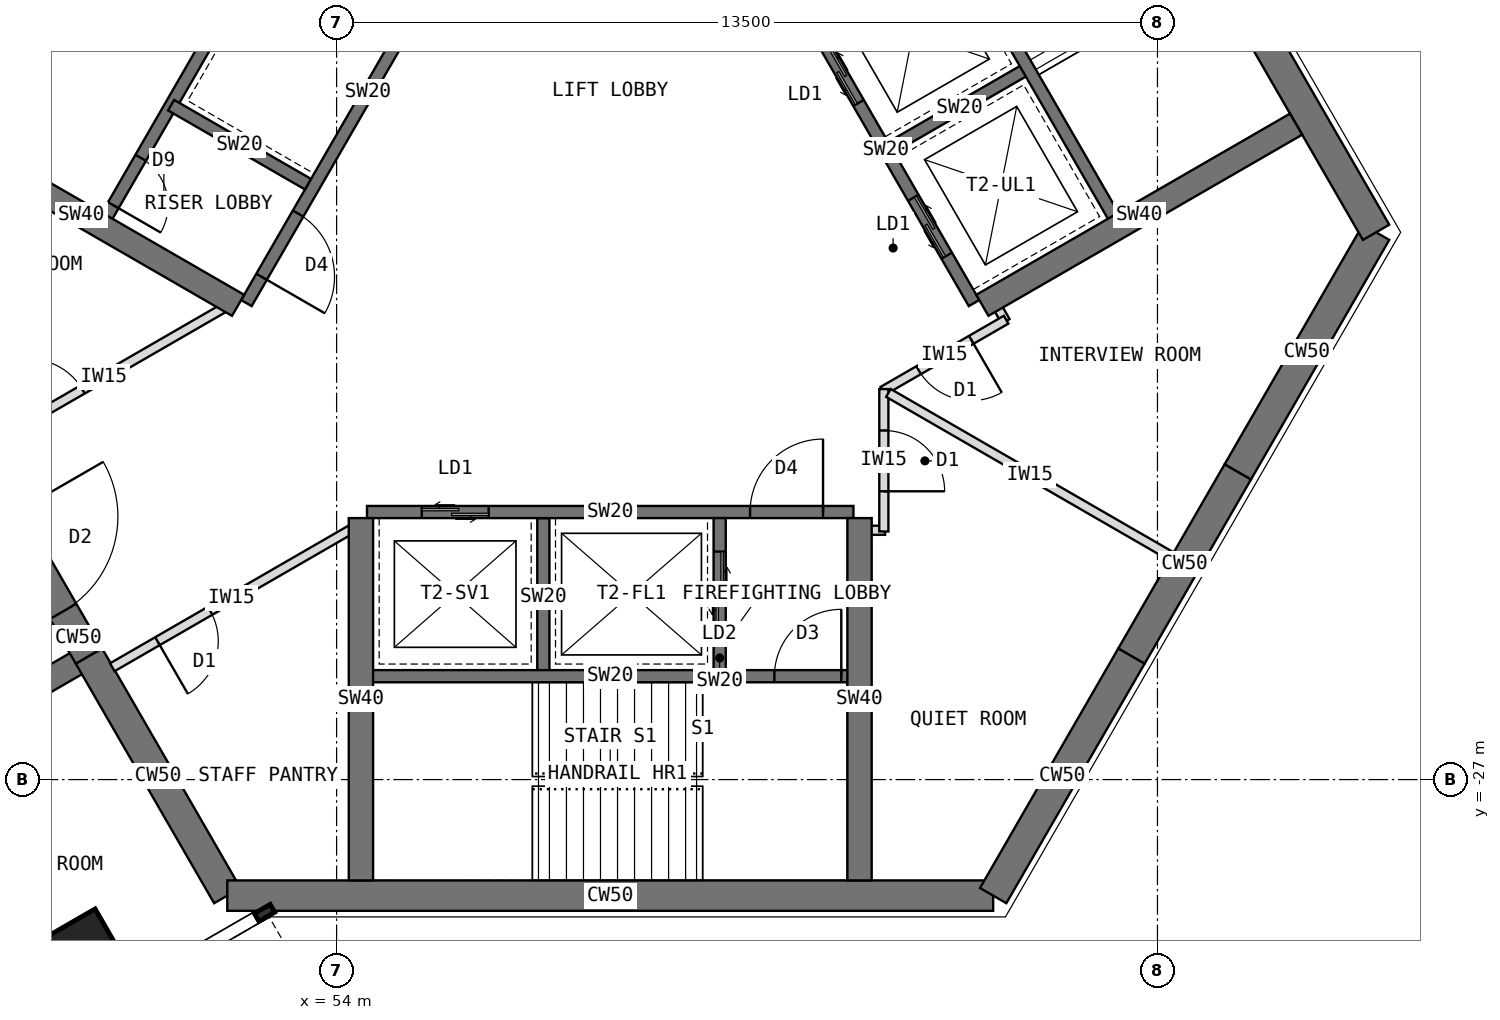
"""IFC4 building model, lengths in metres.
Left out: names, types, materials, properties, quantities, classifications, styles, units other than length and angle.
Written with IfcOpenShell. Run it as: python <this file> out.ifc"""

import sys

from ifc_helpers import new_model, si_unit, direction, frame, frame_2d, origin, origin_2d, place, context, subcontext, project, spatial, rectangle, extrude, element, fill, save


model = new_model("IFC4")
c1 = context("Model", 3, precision=1e-05, world=origin(), true_north=direction((0.0, 1.0)))
c2 = subcontext(c1, "Body", "Model", "MODEL_VIEW")
j1 = project(units=[si_unit("LENGTHUNIT", "METRE"), si_unit("PLANEANGLEUNIT", "RADIAN")], contexts=[c1])
p1 = place(None, origin())
s1 = spatial("IfcSite", under=j1, at=p1, CompositionType="ELEMENT")
p2 = place(p1, origin())
s2 = spatial("IfcBuilding", under=s1, at=p2, CompositionType="ELEMENT")
p3 = place(p2, frame((0.0, 0.0, 186.5)))
s3 = spatial("IfcBuildingStorey", under=s2, at=p3, CompositionType="ELEMENT", Elevation=186.5)
p4 = place(p3, frame((52.202, -7.092, 0.0), z_axis=(0.0, 0.0, 1.0), x_axis=(-0.500005998175, -0.866021940709, 0.0)))
e1 = element("IfcWall", 1, at=p4, inside=s3, PredefinedType="SHEAR", context=c2, shape_type="SweptSolid", body=[
    extrude(rectangle(XDim=12.596, YDim=0.5, at=frame_2d((6.298, 0.0))), origin(), (0.0, 0.0, 1.0), 4.0),
])
p5 = place(p3, frame((48.178, -21.939, 0.0), z_axis=(0.0, 0.0, 1.0), x_axis=(0.500010275428, -0.866019471182, 0.0)))
e2 = element("IfcWall", 2, at=p5, inside=s3, PredefinedType="SHEAR", context=c2, shape_type="SweptSolid", body=[
    extrude(rectangle(XDim=3.5, YDim=0.5, at=frame_2d((1.75, 0.0))), origin(), (0.0, 0.0, 1.0), 4.0),
])
p6 = place(p5, frame((0.85, 0.0, 0.0)))
e3 = element("IfcOpeningElement", 3, at=p6, cuts=e2, PredefinedType="OPENING", context=c2, shape_type="SweptSolid", body=[
    extrude(rectangle(XDim=1.8, YDim=2.1, at=frame_2d((0.9, 1.05))), frame((0.0, 0.26, 0.0), z_axis=(0.0, -1.0, 0.0), x_axis=(1.0, 0.0, 0.0)), (0.0, 0.0, 1.0), 0.52),
])
p7 = place(p3, frame((49.928, -24.97, 0.0), z_axis=(0.0, 0.0, 1.0), x_axis=(0.499984222037, -0.866034513004, 0.0)))
e4 = element("IfcWall", 4, at=p7, inside=s3, PredefinedType="SHEAR", context=c2, shape_type="SweptSolid", body=[
    extrude(rectangle(XDim=4.548, YDim=0.5, at=frame_2d((2.274, 0.0))), origin(), (0.0, 0.0, 1.0), 4.0),
])
p8 = place(p3, frame((52.202, -28.908, 0.0), z_axis=(0.0, 0.0, 1.0), x_axis=(1.0, 0.0, 0.0)))
e5 = element("IfcWall", 5, at=p8, inside=s3, PredefinedType="SHEAR", context=c2, shape_type="SweptSolid", body=[
    extrude(rectangle(XDim=12.596, YDim=0.5, at=frame_2d((6.298, 0.0))), origin(), (0.0, 0.0, 1.0), 4.0),
])
p9 = place(p3, frame((64.798, -28.908, 0.0), z_axis=(0.0, 0.0, 1.0), x_axis=(0.499984222037, 0.866034513004, 0.0)))
e6 = element("IfcWall", 6, at=p9, inside=s3, PredefinedType="SHEAR", context=c2, shape_type="SweptSolid", body=[
    extrude(rectangle(XDim=4.548, YDim=0.5, at=frame_2d((2.274, 0.0))), origin(), (0.0, 0.0, 1.0), 4.0),
])
p10 = place(p3, frame((67.072, -24.97, 0.0), z_axis=(0.0, 0.0, 1.0), x_axis=(0.500010275428, 0.866019471182, 0.0)))
e7 = element("IfcWall", 7, at=p10, inside=s3, PredefinedType="SHEAR", context=c2, shape_type="SweptSolid", body=[
    extrude(rectangle(XDim=3.5, YDim=0.5, at=frame_2d((1.75, 0.0))), origin(), (0.0, 0.0, 1.0), 4.0),
])
p11 = place(p3, frame((68.822, -21.939, 0.0), z_axis=(0.0, 0.0, 1.0), x_axis=(0.500024481964, 0.866011268655, 0.0)))
e8 = element("IfcWall", 8, at=p11, inside=s3, PredefinedType="SHEAR", context=c2, shape_type="SweptSolid", body=[
    extrude(rectangle(XDim=4.548, YDim=0.5, at=frame_2d((2.274, 0.0))), origin(), (0.0, 0.0, 1.0), 4.0),
])
p12 = place(p3, frame((71.096, -18.0, 0.0), z_axis=(0.0, 0.0, 1.0), x_axis=(-0.500005998175, 0.866021940709, 0.0)))
e9 = element("IfcWall", 9, at=p12, inside=s3, PredefinedType="SHEAR", context=c2, shape_type="SweptSolid", body=[
    extrude(rectangle(XDim=12.596, YDim=0.5, at=frame_2d((6.298, 0.0))), origin(), (0.0, 0.0, 1.0), 4.0),
])
p13 = place(p3, frame((49.928, -24.97, 0.0), z_axis=(0.0, 0.0, 1.0), x_axis=(-0.866031863473, -0.499988811324, 0.0)))
e10 = element("IfcWall", 10, at=p13, inside=s3, PredefinedType="SHEAR", context=c2, shape_type="SweptSolid", body=[
    extrude(rectangle(XDim=2.592, YDim=0.4, at=frame_2d((1.296, 0.0))), origin(), (0.0, 0.0, 1.0), 4.0),
])
p14 = place(p3, frame((49.809, -29.946, 0.0), z_axis=(0.0, 0.0, 1.0), x_axis=(0.866025403784, 0.5, 0.0)))
e11 = element("IfcColumn", 11, at=p14, inside=s3, PredefinedType="COLUMN", context=c2, shape_type="SweptSolid", body=[
    extrude(rectangle(XDim=1.2, YDim=1.2, at=origin_2d()), origin(), (0.0, 0.0, 1.0), 4.0),
])
p15 = place(p3, frame((56.516, -12.236, 0.0), z_axis=(0.0, 0.0, 1.0), x_axis=(-0.49999894854, -0.866026010844, 0.0)))
e12 = element("IfcWall", 12, at=p15, inside=s3, PredefinedType="SHEAR", context=c2, shape_type="SweptSolid", body=[
    extrude(rectangle(XDim=8.0, YDim=0.2, at=frame_2d((4.0, 0.0))), origin(), (0.0, 0.0, 1.0), 4.0),
])
p16 = place(p15, frame((6.3, 0.0, 0.0)))
e13 = element("IfcOpeningElement", 13, at=p16, cuts=e12, PredefinedType="OPENING", context=c2, shape_type="SweptSolid", body=[
    extrude(rectangle(XDim=1.2, YDim=2.1, at=frame_2d((0.6, 1.05))), frame((0.0, 0.11, 0.0), z_axis=(0.0, -1.0, 0.0), x_axis=(1.0, 0.0, 0.0)), (0.0, 0.0, 1.0), 0.22),
])
p17 = place(p3, frame((53.53, -17.209, 0.0), z_axis=(0.0, 0.0, 1.0), x_axis=(-0.866062058628, 0.499936506574, 0.0)))
e14 = element("IfcWall", 14, at=p17, inside=s3, PredefinedType="SHEAR", context=c2, shape_type="SweptSolid", body=[
    extrude(rectangle(XDim=2.6, YDim=0.2, at=frame_2d((1.3, 0.0))), origin(), (0.0, 0.0, 1.0), 4.0),
])
p18 = place(p3, frame((54.178, -10.886, 0.0), z_axis=(0.0, 0.0, 1.0), x_axis=(-0.49999894854, -0.866026010844, 0.0)))
e15 = element("IfcWall", 15, at=p18, inside=s3, PredefinedType="SHEAR", context=c2, shape_type="SweptSolid", body=[
    extrude(rectangle(XDim=8.0, YDim=0.2, at=frame_2d((4.0, 0.0))), origin(), (0.0, 0.0, 1.0), 4.0),
])
p19 = place(p18, frame((6.8, 0.0, 0.0)))
e16 = element("IfcOpeningElement", 16, at=p19, cuts=e15, PredefinedType="OPENING", context=c2, shape_type="SweptSolid", body=[
    extrude(rectangle(XDim=0.9, YDim=2.1, at=frame_2d((0.45, 1.05))), frame((0.0, 0.11, 0.0), z_axis=(0.0, -1.0, 0.0), x_axis=(1.0, 0.0, 0.0)), (0.0, 0.0, 1.0), 0.22),
])
p20 = place(p3, frame((52.38, -19.201, 0.0), z_axis=(0.0, 0.0, 1.0), x_axis=(-0.866012946976, 0.500021575205, 0.0)))
e17 = element("IfcWall", 17, at=p20, inside=s3, PredefinedType="SHEAR", context=c2, shape_type="SweptSolid", body=[
    extrude(rectangle(XDim=5.958, YDim=0.4, at=frame_2d((2.979, 0.0))), origin(), (0.0, 0.0, 1.0), 4.0),
])
p21 = place(p3, frame((54.5, -22.6, 0.0), z_axis=(0.0, 0.0, 1.0), x_axis=(1.0, 0.0, 0.0)))
e18 = element("IfcWall", 18, at=p21, inside=s3, PredefinedType="SHEAR", context=c2, shape_type="SweptSolid", body=[
    extrude(rectangle(XDim=8.0, YDim=0.2, at=frame_2d((4.0, 0.0))), origin(), (0.0, 0.0, 1.0), 4.0),
])
p22 = place(p21, frame((6.3, 0.0, 0.0)))
e19 = element("IfcOpeningElement", 19, at=p22, cuts=e18, PredefinedType="OPENING", context=c2, shape_type="SweptSolid", body=[
    extrude(rectangle(XDim=1.2, YDim=2.1, at=frame_2d((0.6, 1.05))), frame((0.0, 0.11, 0.0), z_axis=(0.0, -1.0, 0.0), x_axis=(1.0, 0.0, 0.0)), (0.0, 0.0, 1.0), 0.22),
])
p23 = place(p21, frame((0.9, 0.0, 0.0)))
e20 = element("IfcOpeningElement", 20, at=p23, cuts=e18, PredefinedType="OPENING", context=c2, shape_type="SweptSolid", body=[
    extrude(rectangle(XDim=1.1, YDim=2.2, at=frame_2d((0.55, 1.1))), frame((0.0, 0.11, 0.0), z_axis=(0.0, -1.0, 0.0), x_axis=(1.0, 0.0, 0.0)), (0.0, 0.0, 1.0), 0.22),
])
p24 = place(p3, frame((57.4, -22.7, 0.0), z_axis=(0.0, 0.0, 1.0), x_axis=(0.0, -1.0, 0.0)))
e21 = element("IfcWall", 21, at=p24, inside=s3, PredefinedType="SHEAR", context=c2, shape_type="SweptSolid", body=[
    extrude(rectangle(XDim=2.6, YDim=0.2, at=frame_2d((1.3, 0.0))), origin(), (0.0, 0.0, 1.0), 4.0),
])
p25 = place(p3, frame((60.3, -22.7, 0.0), z_axis=(0.0, 0.0, 1.0), x_axis=(0.0, -1.0, 0.0)))
e22 = element("IfcWall", 22, at=p25, inside=s3, PredefinedType="SHEAR", context=c2, shape_type="SweptSolid", body=[
    extrude(rectangle(XDim=2.6, YDim=0.2, at=frame_2d((1.3, 0.0))), origin(), (0.0, 0.0, 1.0), 4.0),
])
p26 = place(p25, frame((0.55, 0.0, 0.0)))
e23 = element("IfcOpeningElement", 23, at=p26, cuts=e22, PredefinedType="OPENING", context=c2, shape_type="SweptSolid", body=[
    extrude(rectangle(XDim=1.3, YDim=2.2, at=frame_2d((0.65, 1.1))), frame((0.0, 0.11, 0.0), z_axis=(0.0, -1.0, 0.0), x_axis=(1.0, 0.0, 0.0)), (0.0, 0.0, 1.0), 0.22),
])
p27 = place(p3, frame((54.5, -25.3, 0.0), z_axis=(0.0, 0.0, 1.0), x_axis=(1.0, 0.0, 0.0)))
e24 = element("IfcWall", 24, at=p27, inside=s3, PredefinedType="SHEAR", context=c2, shape_type="SweptSolid", body=[
    extrude(rectangle(XDim=8.0, YDim=0.2, at=frame_2d((4.0, 0.0))), origin(), (0.0, 0.0, 1.0), 4.0),
])
p28 = place(p27, frame((6.7, 0.0, 0.0)))
e25 = element("IfcOpeningElement", 25, at=p28, cuts=e24, PredefinedType="OPENING", context=c2, shape_type="SweptSolid", body=[
    extrude(rectangle(XDim=1.1, YDim=2.1, at=frame_2d((0.55, 1.05))), frame((0.0, 0.11, 0.0), z_axis=(0.0, -1.0, 0.0), x_axis=(1.0, 0.0, 0.0)), (0.0, 0.0, 1.0), 0.22),
])
for number, where, z_axis, x_axis in (
    (26, (62.6, -22.7, 0.0), (0.0, 0.0, 1.0), (0.0, -1.0, 0.0)),
    (27, (54.4, -22.7, 0.0), (0.0, 0.0, 1.0), (0.0, -1.0, 0.0)),
):
    element("IfcWall", number, at=place(p3, frame(where, z_axis=z_axis, x_axis=x_axis)), inside=s3, PredefinedType="SHEAR", context=c2, shape_type="SweptSolid", body=[
        extrude(rectangle(XDim=5.958, YDim=0.4, at=frame_2d((2.979, 0.0))), origin(), (0.0, 0.0, 1.0), 4.0),
    ])
p29 = place(p3, frame((64.484, -19.164, 0.0), z_axis=(0.0, 0.0, 1.0), x_axis=(-0.49999894854, 0.866026010844, 0.0)))
e28 = element("IfcWall", 28, at=p29, inside=s3, PredefinedType="SHEAR", context=c2, shape_type="SweptSolid", body=[
    extrude(rectangle(XDim=8.0, YDim=0.2, at=frame_2d((4.0, 0.0))), origin(), (0.0, 0.0, 1.0), 4.0),
])
p30 = place(p29, frame((6.3, 0.0, 0.0)))
e29 = element("IfcOpeningElement", 29, at=p30, cuts=e28, PredefinedType="OPENING", context=c2, shape_type="SweptSolid", body=[
    extrude(rectangle(XDim=1.2, YDim=2.1, at=frame_2d((0.6, 1.05))), frame((0.0, 0.11, 0.0), z_axis=(0.0, -1.0, 0.0), x_axis=(1.0, 0.0, 0.0)), (0.0, 0.0, 1.0), 0.22),
])
p31 = place(p29, frame((0.9, 0.0, 0.0)))
e30 = element("IfcOpeningElement", 30, at=p31, cuts=e28, PredefinedType="OPENING", context=c2, shape_type="SweptSolid", body=[
    extrude(rectangle(XDim=1.1, YDim=2.2, at=frame_2d((0.55, 1.1))), frame((0.0, 0.11, 0.0), z_axis=(0.0, -1.0, 0.0), x_axis=(1.0, 0.0, 0.0)), (0.0, 0.0, 1.0), 0.22),
])
p32 = place(p29, frame((3.8, 0.0, 0.0)))
e31 = element("IfcOpeningElement", 31, at=p32, cuts=e28, PredefinedType="OPENING", context=c2, shape_type="SweptSolid", body=[
    extrude(rectangle(XDim=1.1, YDim=2.2, at=frame_2d((0.55, 1.1))), frame((0.0, 0.11, 0.0), z_axis=(0.0, -1.0, 0.0), x_axis=(1.0, 0.0, 0.0)), (0.0, 0.0, 1.0), 0.22),
])
p33 = place(p3, frame((63.12, -16.603, 0.0), z_axis=(0.0, 0.0, 1.0), x_axis=(0.866062058628, 0.499936506574, 0.0)))
e32 = element("IfcWall", 32, at=p33, inside=s3, PredefinedType="SHEAR", context=c2, shape_type="SweptSolid", body=[
    extrude(rectangle(XDim=2.6, YDim=0.2, at=frame_2d((1.3, 0.0))), origin(), (0.0, 0.0, 1.0), 4.0),
])
p34 = place(p3, frame((66.822, -17.814, 0.0), z_axis=(0.0, 0.0, 1.0), x_axis=(-0.49999894854, 0.866026010844, 0.0)))
e33 = element("IfcWall", 33, at=p34, inside=s3, PredefinedType="SHEAR", context=c2, shape_type="SweptSolid", body=[
    extrude(rectangle(XDim=8.0, YDim=0.2, at=frame_2d((4.0, 0.0))), origin(), (0.0, 0.0, 1.0), 4.0),
])
p35 = place(p34, frame((6.7, 0.0, 0.0)))
e34 = element("IfcOpeningElement", 34, at=p35, cuts=e33, PredefinedType="OPENING", context=c2, shape_type="SweptSolid", body=[
    extrude(rectangle(XDim=1.1, YDim=2.1, at=frame_2d((0.55, 1.05))), frame((0.0, 0.11, 0.0), z_axis=(0.0, -1.0, 0.0), x_axis=(1.0, 0.0, 0.0)), (0.0, 0.0, 1.0), 0.22),
])
p36 = place(p3, frame((64.62, -19.201, 0.0), z_axis=(0.0, 0.0, 1.0), x_axis=(0.866012946976, 0.500021575205, 0.0)))
e35 = element("IfcWall", 35, at=p36, inside=s3, PredefinedType="SHEAR", context=c2, shape_type="SweptSolid", body=[
    extrude(rectangle(XDim=5.958, YDim=0.4, at=frame_2d((2.979, 0.0))), origin(), (0.0, 0.0, 1.0), 4.0),
])
p37 = place(p3, frame((63.02, -22.9, 0.0), z_axis=(0.0, 0.0, 1.0), x_axis=(-1.0, 0.0, 0.0)))
e36 = element("IfcWall", 36, at=p37, inside=s3, PredefinedType="PARTITIONING", context=c2, shape_type="SweptSolid", body=[
    extrude(rectangle(XDim=0.43, YDim=0.15, at=frame_2d((0.215, 0.0))), origin(), (0.0, 0.0, 1.0), 3.8),
])
p38 = place(p3, frame((54.23, -22.89, 0.0), z_axis=(0.0, 0.0, 1.0), x_axis=(-0.866006805923, -0.500032211057, 0.0)))
e37 = element("IfcWall", 37, at=p38, inside=s3, PredefinedType="PARTITIONING", context=c2, shape_type="SweptSolid", body=[
    extrude(rectangle(XDim=4.526, YDim=0.15, at=frame_2d((2.263, 0.0))), origin(), (0.0, 0.0, 1.0), 3.8),
])
p39 = place(p38, frame((2.668, 0.0, 0.0)))
e38 = element("IfcOpeningElement", 38, at=p39, cuts=e37, PredefinedType="OPENING", context=c2, shape_type="SweptSolid", body=[
    extrude(rectangle(XDim=1.0, YDim=2.1, at=frame_2d((0.5, 1.05))), frame((0.0, 0.085, 0.0), z_axis=(0.0, -1.0, 0.0), x_axis=(1.0, 0.0, 0.0)), (0.0, 0.0, 1.0), 0.17),
])
p40 = place(p3, frame((48.211, -21.515, 0.0), z_axis=(0.0, 0.0, 1.0), x_axis=(0.866043651885, 0.499968392031, 0.0)))
e39 = element("IfcWall", 39, at=p40, inside=s3, PredefinedType="PARTITIONING", context=c2, shape_type="SweptSolid", body=[
    extrude(rectangle(XDim=4.526, YDim=0.15, at=frame_2d((2.263, 0.0))), origin(), (0.0, 0.0, 1.0), 3.8),
])
p41 = place(p40, frame((0.858, 0.0, 0.0)))
e40 = element("IfcOpeningElement", 40, at=p41, cuts=e39, PredefinedType="OPENING", context=c2, shape_type="SweptSolid", body=[
    extrude(rectangle(XDim=1.0, YDim=2.1, at=frame_2d((0.5, 1.05))), frame((0.0, 0.085, 0.0), z_axis=(0.0, -1.0, 0.0), x_axis=(1.0, 0.0, 0.0)), (0.0, 0.0, 1.0), 0.17),
])
p42 = place(p3, frame((64.789, -19.092, 0.0), z_axis=(0.0, 0.0, 1.0), x_axis=(0.499804398801, -0.866138304741, 0.0)))
e41 = element("IfcWall", 41, at=p42, inside=s3, PredefinedType="PARTITIONING", context=c2, shape_type="SweptSolid", body=[
    extrude(rectangle(XDim=0.43, YDim=0.15, at=frame_2d((0.215, 0.0))), origin(), (0.0, 0.0, 1.0), 3.8),
])
p43 = place(p3, frame((65.011, -19.437, 0.0), z_axis=(0.0, 0.0, 1.0), x_axis=(-0.865982457891, -0.500074377092, 0.0)))
e42 = element("IfcWall", 42, at=p43, inside=s3, PredefinedType="PARTITIONING", context=c2, shape_type="SweptSolid", body=[
    extrude(rectangle(XDim=2.342, YDim=0.15, at=frame_2d((1.171, 0.0))), origin(), (0.0, 0.0, 1.0), 3.8),
])
p44 = place(p43, frame((0.661, 0.0, 0.0)))
e43 = element("IfcOpeningElement", 43, at=p44, cuts=e42, PredefinedType="OPENING", context=c2, shape_type="SweptSolid", body=[
    extrude(rectangle(XDim=1.0, YDim=2.1, at=frame_2d((0.5, 1.05))), frame((0.0, 0.085, 0.0), z_axis=(0.0, -1.0, 0.0), x_axis=(1.0, 0.0, 0.0)), (0.0, 0.0, 1.0), 0.17),
])
p45 = place(p3, frame((63.0, -20.578, 0.0), z_axis=(0.0, 0.0, 1.0), x_axis=(0.0, -1.0, 0.0)))
e44 = element("IfcWall", 44, at=p45, inside=s3, PredefinedType="PARTITIONING", context=c2, shape_type="SweptSolid", body=[
    extrude(rectangle(XDim=2.342, YDim=0.15, at=frame_2d((1.171, 0.0))), origin(), (0.0, 0.0, 1.0), 3.8),
])
p46 = place(p45, frame((0.681, 0.0, 0.0)))
e45 = element("IfcOpeningElement", 45, at=p46, cuts=e44, PredefinedType="OPENING", context=c2, shape_type="SweptSolid", body=[
    extrude(rectangle(XDim=1.0, YDim=2.1, at=frame_2d((0.5, 1.05))), frame((0.0, 0.085, 0.0), z_axis=(0.0, -1.0, 0.0), x_axis=(1.0, 0.0, 0.0)), (0.0, 0.0, 1.0), 0.17),
])
p47 = place(p3, frame((63.075, -20.641, 0.0), z_axis=(0.0, 0.0, 1.0), x_axis=(0.866035084688, -0.499983231807, 0.0)))
e46 = element("IfcWall", 46, at=p47, inside=s3, PredefinedType="PARTITIONING", context=c2, shape_type="SweptSolid", body=[
    extrude(rectangle(XDim=5.376, YDim=0.15, at=frame_2d((2.688, 0.0))), origin(), (0.0, 0.0, 1.0), 3.8),
])
p48 = place(p16, origin())
e47 = element("IfcDoor", 47, at=p48, inside=s3, OperationType="SINGLE_SWING_RIGHT", PredefinedType="DOOR", context=c2, shape_type="SweptSolid", body=[
    extrude(rectangle(XDim=1.2, YDim=2.1, at=frame_2d((0.6, 1.05))), frame((0.0, 0.025, 0.0), z_axis=(0.0, -1.0, 0.0), x_axis=(1.0, 0.0, 0.0)), (0.0, 0.0, 1.0), 0.05),
])
fill(e13, e47)
p49 = place(p19, origin())
e48 = element("IfcDoor", 48, at=p49, inside=s3, OperationType="SINGLE_SWING_RIGHT", PredefinedType="DOOR", context=c2, shape_type="SweptSolid", body=[
    extrude(rectangle(XDim=0.9, YDim=2.1, at=frame_2d((0.45, 1.05))), frame((0.0, 0.025, 0.0), z_axis=(0.0, -1.0, 0.0), x_axis=(1.0, 0.0, 0.0)), (0.0, 0.0, 1.0), 0.05),
])
fill(e16, e48)
p50 = place(p22, origin())
e49 = element("IfcDoor", 49, at=p50, inside=s3, OperationType="SINGLE_SWING_RIGHT", PredefinedType="DOOR", context=c2, shape_type="SweptSolid", body=[
    extrude(rectangle(XDim=1.2, YDim=2.1, at=frame_2d((0.6, 1.05))), frame((0.0, 0.025, 0.0), z_axis=(0.0, -1.0, 0.0), x_axis=(1.0, 0.0, 0.0)), (0.0, 0.0, 1.0), 0.05),
])
fill(e19, e49)
p51 = place(p26, origin())
e50 = element("IfcDoor", 50, at=p51, inside=s3, OperationType="DOUBLE_DOOR_SLIDING", PredefinedType="DOOR", context=c2, shape_type="SweptSolid", body=[
    extrude(rectangle(XDim=1.3, YDim=2.2, at=frame_2d((0.65, 1.1))), frame((0.0, 0.025, 0.0), z_axis=(0.0, -1.0, 0.0), x_axis=(1.0, 0.0, 0.0)), (0.0, 0.0, 1.0), 0.05),
])
fill(e23, e50)
p52 = place(p23, origin())
e51 = element("IfcDoor", 51, at=p52, inside=s3, OperationType="DOUBLE_DOOR_SLIDING", PredefinedType="DOOR", context=c2, shape_type="SweptSolid", body=[
    extrude(rectangle(XDim=1.1, YDim=2.2, at=frame_2d((0.55, 1.1))), frame((0.0, 0.025, 0.0), z_axis=(0.0, -1.0, 0.0), x_axis=(1.0, 0.0, 0.0)), (0.0, 0.0, 1.0), 0.05),
])
fill(e20, e51)
p53 = place(p28, origin())
e52 = element("IfcDoor", 52, at=p53, inside=s3, OperationType="SINGLE_SWING_RIGHT", PredefinedType="DOOR", context=c2, shape_type="SweptSolid", body=[
    extrude(rectangle(XDim=1.1, YDim=2.1, at=frame_2d((0.55, 1.05))), frame((0.0, 0.025, 0.0), z_axis=(0.0, -1.0, 0.0), x_axis=(1.0, 0.0, 0.0)), (0.0, 0.0, 1.0), 0.05),
])
fill(e25, e52)
p54 = place(p31, origin())
e53 = element("IfcDoor", 53, at=p54, inside=s3, OperationType="DOUBLE_DOOR_SLIDING", PredefinedType="DOOR", context=c2, shape_type="SweptSolid", body=[
    extrude(rectangle(XDim=1.1, YDim=2.2, at=frame_2d((0.55, 1.1))), frame((0.0, 0.025, 0.0), z_axis=(0.0, -1.0, 0.0), x_axis=(1.0, 0.0, 0.0)), (0.0, 0.0, 1.0), 0.05),
])
fill(e30, e53)
p55 = place(p32, origin())
e54 = element("IfcDoor", 54, at=p55, inside=s3, OperationType="DOUBLE_DOOR_SLIDING", PredefinedType="DOOR", context=c2, shape_type="SweptSolid", body=[
    extrude(rectangle(XDim=1.1, YDim=2.2, at=frame_2d((0.55, 1.1))), frame((0.0, 0.025, 0.0), z_axis=(0.0, -1.0, 0.0), x_axis=(1.0, 0.0, 0.0)), (0.0, 0.0, 1.0), 0.05),
])
fill(e31, e54)
p56 = place(p6, origin())
e55 = element("IfcDoor", 55, at=p56, inside=s3, OperationType="DOUBLE_DOOR_DOUBLE_SWING", PredefinedType="DOOR", context=c2, shape_type="SweptSolid", body=[
    extrude(rectangle(XDim=1.8, YDim=2.1, at=frame_2d((0.9, 1.05))), frame((0.0, 0.025, 0.0), z_axis=(0.0, -1.0, 0.0), x_axis=(1.0, 0.0, 0.0)), (0.0, 0.0, 1.0), 0.05),
])
fill(e3, e55)
p57 = place(p41, origin())
e56 = element("IfcDoor", 56, at=p57, inside=s3, OperationType="SINGLE_SWING_LEFT", PredefinedType="DOOR", context=c2, shape_type="SweptSolid", body=[
    extrude(rectangle(XDim=1.0, YDim=2.1, at=frame_2d((0.5, 1.05))), frame((0.0, 0.025, 0.0), z_axis=(0.0, -1.0, 0.0), x_axis=(1.0, 0.0, 0.0)), (0.0, 0.0, 1.0), 0.05),
])
fill(e40, e56)
p58 = place(p39, origin())
e57 = element("IfcDoor", 57, at=p58, inside=s3, OperationType="SINGLE_SWING_RIGHT", PredefinedType="DOOR", context=c2, shape_type="SweptSolid", body=[
    extrude(rectangle(XDim=1.0, YDim=2.1, at=frame_2d((0.5, 1.05))), frame((0.0, 0.025, 0.0), z_axis=(0.0, -1.0, 0.0), x_axis=(1.0, 0.0, 0.0)), (0.0, 0.0, 1.0), 0.05),
])
fill(e38, e57)
p59 = place(p46, origin())
e58 = element("IfcDoor", 58, at=p59, inside=s3, OperationType="SINGLE_SWING_RIGHT", PredefinedType="DOOR", context=c2, shape_type="SweptSolid", body=[
    extrude(rectangle(XDim=1.0, YDim=2.1, at=frame_2d((0.5, 1.05))), frame((0.0, 0.025, 0.0), z_axis=(0.0, -1.0, 0.0), x_axis=(1.0, 0.0, 0.0)), (0.0, 0.0, 1.0), 0.05),
])
fill(e45, e58)
p60 = place(p44, origin())
e59 = element("IfcDoor", 59, at=p60, inside=s3, OperationType="SINGLE_SWING_LEFT", PredefinedType="DOOR", context=c2, shape_type="SweptSolid", body=[
    extrude(rectangle(XDim=1.0, YDim=2.1, at=frame_2d((0.5, 1.05))), frame((0.0, 0.025, 0.0), z_axis=(0.0, -1.0, 0.0), x_axis=(1.0, 0.0, 0.0)), (0.0, 0.0, 1.0), 0.05),
])
fill(e43, e59)
save(model, sys.argv[1])
